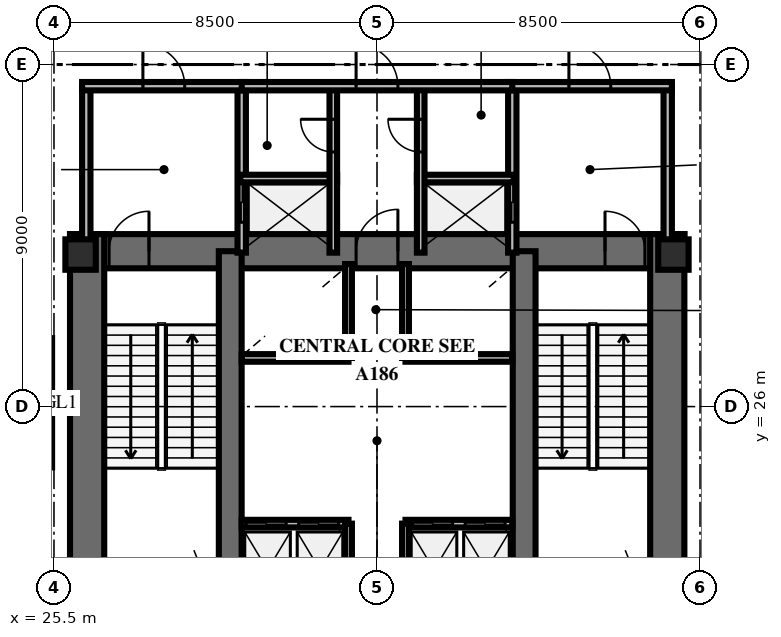
"""IFC4 building model, lengths in metres.
Left out: names, types, materials, properties, quantities, classifications, styles, units other than length and angle.
Written with IfcOpenShell. Run it as: python <this file> out.ifc"""

import sys

from ifc_helpers import new_model, si_unit, direction, frame, frame_2d, origin, origin_2d, place, context, subcontext, project, spatial, rectangle, extrude, element, fill, save


model = new_model("IFC4")
c1 = context("Model", 3, precision=1e-05, world=origin(), true_north=direction((0.0, 1.0)))
c2 = subcontext(c1, "Body", "Model", "MODEL_VIEW")
j1 = project(units=[si_unit("LENGTHUNIT", "METRE"), si_unit("PLANEANGLEUNIT", "RADIAN")], contexts=[c1])
p1 = place(None, origin())
s1 = spatial("IfcSite", under=j1, at=p1, CompositionType="ELEMENT")
p2 = place(p1, origin())
s2 = spatial("IfcBuilding", under=s1, at=p2, CompositionType="ELEMENT")
p3 = place(p2, frame((0.0, 0.0, 15.6)))
s3 = spatial("IfcBuildingStorey", under=s2, at=p3, CompositionType="ELEMENT", Elevation=15.6)
p4 = place(p3, frame((25.922, 30.088, 0.0), z_axis=(0.0, 0.0, 1.0), x_axis=(1.0, 0.0, 0.0)))
e1 = element("IfcWall", 1, at=p4, inside=s3, PredefinedType="SHEAR", context=c2, shape_type="SweptSolid", body=[
    extrude(rectangle(XDim=16.166, YDim=0.9, at=frame_2d((8.083, 0.0))), origin(), (0.0, 0.0, 1.0), 4.8),
])
p5 = place(p4, frame((1.028, 0.0, 0.0)))
e2 = element("IfcOpeningElement", 2, at=p5, cuts=e1, PredefinedType="OPENING", context=c2, shape_type="SweptSolid", body=[
    extrude(rectangle(XDim=1.05, YDim=2.15, at=frame_2d((0.525, 1.075))), frame((0.0, 0.46, 0.0), z_axis=(0.0, -1.0, 0.0), x_axis=(1.0, 0.0, 0.0)), (0.0, 0.0, 1.0), 0.92),
])
p6 = place(p4, frame((14.078, 0.0, 0.0)))
e3 = element("IfcOpeningElement", 3, at=p6, cuts=e1, PredefinedType="OPENING", context=c2, shape_type="SweptSolid", body=[
    extrude(rectangle(XDim=1.05, YDim=2.15, at=frame_2d((0.525, 1.075))), frame((0.0, 0.46, 0.0), z_axis=(0.0, -1.0, 0.0), x_axis=(1.0, 0.0, 0.0)), (0.0, 0.0, 1.0), 0.92),
])
p7 = place(p4, frame((7.528, 0.0, 0.0)))
e4 = element("IfcOpeningElement", 4, at=p7, cuts=e1, PredefinedType="OPENING", context=c2, shape_type="SweptSolid", body=[
    extrude(rectangle(XDim=1.1, YDim=2.15, at=frame_2d((0.55, 1.075))), frame((0.0, 0.46, 0.0), z_axis=(0.0, -1.0, 0.0), x_axis=(1.0, 0.0, 0.0)), (0.0, 0.0, 1.0), 0.92),
])
for number, where, z_axis, x_axis in (
    (5, (26.372, 19.662, 0.0), (0.0, 0.0, 1.0), (0.0, 1.0, 0.0)),
    (6, (41.638, 19.662, 0.0), (0.0, 0.0, 1.0), (0.0, 1.0, 0.0)),
):
    element("IfcWall", number, at=place(p3, frame(where, z_axis=z_axis, x_axis=x_axis)), inside=s3, PredefinedType="SHEAR", context=c2, shape_type="SweptSolid", body=[
        extrude(rectangle(XDim=10.876, YDim=0.9, at=frame_2d((5.438, 0.0))), origin(), (0.0, 0.0, 1.0), 4.8),
    ])
for number, where, z_axis, x_axis in (
    (7, (30.138, 20.112, 0.0), (0.0, 0.0, 1.0), (0.0, 1.0, 0.0)),
    (8, (37.872, 20.112, 0.0), (0.0, 0.0, 1.0), (0.0, 1.0, 0.0)),
):
    element("IfcWall", number, at=place(p3, frame(where, z_axis=z_axis, x_axis=x_axis)), inside=s3, PredefinedType="SHEAR", context=c2, shape_type="SweptSolid", body=[
        extrude(rectangle(XDim=9.976, YDim=0.6, at=frame_2d((4.988, 0.0))), origin(), (0.0, 0.0, 1.0), 4.8),
    ])
for number, where, z_axis, x_axis in (
    (9, (26.2, 30.0, 0.0), (0.0, 0.0, 1.0), (1.0, 0.0, 0.0)),
    (10, (41.8, 30.0, 0.0), (0.0, 0.0, 1.0), (1.0, 0.0, 0.0)),
):
    element("IfcColumn", number, at=place(p3, frame(where, z_axis=z_axis, x_axis=x_axis)), inside=s3, PredefinedType="PILASTER", context=c2, shape_type="SweptSolid", body=[
        extrude(rectangle(XDim=0.8, YDim=0.8, at=origin_2d()), origin(), (0.0, 0.0, 1.0), 4.8),
    ])
p8 = place(p3, frame((26.35, 30.05, 0.0), z_axis=(0.0, 0.0, 1.0), x_axis=(0.0, 1.0, 0.0)))
e11 = element("IfcWall", 11, at=p8, inside=s3, PredefinedType="SOLIDWALL", context=c2, shape_type="SweptSolid", body=[
    extrude(rectangle(XDim=4.38, YDim=0.22, at=frame_2d((2.19, 0.0))), origin(), (0.0, 0.0, 1.0), 2.61),
])
p9 = place(p3, frame((30.44, 30.05, 0.0), z_axis=(0.0, 0.0, 1.0), x_axis=(0.0, 1.0, 0.0)))
e12 = element("IfcWall", 12, at=p9, inside=s3, PredefinedType="SOLIDWALL", context=c2, shape_type="SweptSolid", body=[
    extrude(rectangle(XDim=4.38, YDim=0.22, at=frame_2d((2.19, 0.0))), origin(), (0.0, 0.0, 1.0), 2.61),
])
p10 = place(p9, frame((0.8, 0.0, 0.0)))
e13 = element("IfcOpeningElement", 13, at=p10, cuts=e12, PredefinedType="OPENING", context=c2, shape_type="SweptSolid", body=[
    extrude(rectangle(XDim=1.05, YDim=2.1, at=frame_2d((0.525, 1.05))), frame((0.0, 0.12, 0.0), z_axis=(0.0, -1.0, 0.0), x_axis=(1.0, 0.0, 0.0)), (0.0, 0.0, 1.0), 0.24),
])
p11 = place(p3, frame((26.24, 34.43, 0.0), z_axis=(0.0, 0.0, 1.0), x_axis=(1.0, 0.0, 0.0)))
e14 = element("IfcWall", 14, at=p11, inside=s3, PredefinedType="SOLIDWALL", context=c2, shape_type="SweptSolid", body=[
    extrude(rectangle(XDim=4.31, YDim=0.22, at=frame_2d((2.155, 0.0))), origin(), (0.0, 0.0, 1.0), 2.61),
])
p12 = place(p11, frame((1.6, 0.0, 0.0)))
e15 = element("IfcOpeningElement", 15, at=p12, cuts=e14, PredefinedType="OPENING", context=c2, shape_type="SweptSolid", body=[
    extrude(rectangle(XDim=1.1, YDim=2.15, at=frame_2d((0.55, 1.075))), frame((0.0, 0.12, 0.0), z_axis=(0.0, -1.0, 0.0), x_axis=(1.0, 0.0, 0.0)), (0.0, 0.0, 1.0), 0.24),
])
p13 = place(p3, frame((30.4, 32.0, 0.0), z_axis=(0.0, 0.0, 1.0), x_axis=(1.0, 0.0, 0.0)))
e16 = element("IfcWall", 16, at=p13, inside=s3, PredefinedType="SOLIDWALL", context=c2, shape_type="SweptSolid", body=[
    extrude(rectangle(XDim=2.55, YDim=0.2, at=frame_2d((1.275, 0.0))), origin(), (0.0, 0.0, 1.0), 2.61),
])
p14 = place(p3, frame((32.85, 30.05, 0.0), z_axis=(0.0, 0.0, 1.0), x_axis=(0.0, 1.0, 0.0)))
e17 = element("IfcWall", 17, at=p14, inside=s3, PredefinedType="SOLIDWALL", context=c2, shape_type="SweptSolid", body=[
    extrude(rectangle(XDim=4.38, YDim=0.2, at=frame_2d((2.19, 0.0))), origin(), (0.0, 0.0, 1.0), 2.61),
])
p15 = place(p14, frame((2.65, 0.0, 0.0)))
e18 = element("IfcOpeningElement", 18, at=p15, cuts=e17, PredefinedType="OPENING", context=c2, shape_type="SweptSolid", body=[
    extrude(rectangle(XDim=0.86, YDim=2.05, at=frame_2d((0.43, 1.025))), frame((0.0, 0.11, 0.0), z_axis=(0.0, -1.0, 0.0), x_axis=(1.0, 0.0, 0.0)), (0.0, 0.0, 1.0), 0.22),
])
p16 = place(p3, frame((37.56, 30.05, 0.0), z_axis=(0.0, 0.0, 1.0), x_axis=(0.0, 1.0, 0.0)))
e19 = element("IfcWall", 19, at=p16, inside=s3, PredefinedType="SOLIDWALL", context=c2, shape_type="SweptSolid", body=[
    extrude(rectangle(XDim=4.38, YDim=0.22, at=frame_2d((2.19, 0.0))), origin(), (0.0, 0.0, 1.0), 2.61),
])
p17 = place(p16, frame((0.8, 0.0, 0.0)))
e20 = element("IfcOpeningElement", 20, at=p17, cuts=e19, PredefinedType="OPENING", context=c2, shape_type="SweptSolid", body=[
    extrude(rectangle(XDim=1.05, YDim=2.1, at=frame_2d((0.525, 1.05))), frame((0.0, 0.12, 0.0), z_axis=(0.0, -1.0, 0.0), x_axis=(1.0, 0.0, 0.0)), (0.0, 0.0, 1.0), 0.24),
])
p18 = place(p3, frame((41.65, 30.05, 0.0), z_axis=(0.0, 0.0, 1.0), x_axis=(0.0, 1.0, 0.0)))
e21 = element("IfcWall", 21, at=p18, inside=s3, PredefinedType="SOLIDWALL", context=c2, shape_type="SweptSolid", body=[
    extrude(rectangle(XDim=4.38, YDim=0.22, at=frame_2d((2.19, 0.0))), origin(), (0.0, 0.0, 1.0), 2.61),
])
p19 = place(p3, frame((37.45, 34.43, 0.0), z_axis=(0.0, 0.0, 1.0), x_axis=(1.0, 0.0, 0.0)))
e22 = element("IfcWall", 22, at=p19, inside=s3, PredefinedType="SOLIDWALL", context=c2, shape_type="SweptSolid", body=[
    extrude(rectangle(XDim=4.31, YDim=0.22, at=frame_2d((2.155, 0.0))), origin(), (0.0, 0.0, 1.0), 2.61),
])
p20 = place(p19, frame((1.6, 0.0, 0.0)))
e23 = element("IfcOpeningElement", 23, at=p20, cuts=e22, PredefinedType="OPENING", context=c2, shape_type="SweptSolid", body=[
    extrude(rectangle(XDim=1.1, YDim=2.15, at=frame_2d((0.55, 1.075))), frame((0.0, 0.12, 0.0), z_axis=(0.0, -1.0, 0.0), x_axis=(1.0, 0.0, 0.0)), (0.0, 0.0, 1.0), 0.24),
])
p21 = place(p3, frame((35.05, 32.0, 0.0), z_axis=(0.0, 0.0, 1.0), x_axis=(1.0, 0.0, 0.0)))
e24 = element("IfcWall", 24, at=p21, inside=s3, PredefinedType="SOLIDWALL", context=c2, shape_type="SweptSolid", body=[
    extrude(rectangle(XDim=2.55, YDim=0.2, at=frame_2d((1.275, 0.0))), origin(), (0.0, 0.0, 1.0), 2.61),
])
p22 = place(p3, frame((35.15, 30.05, 0.0), z_axis=(0.0, 0.0, 1.0), x_axis=(0.0, 1.0, 0.0)))
e25 = element("IfcWall", 25, at=p22, inside=s3, PredefinedType="SOLIDWALL", context=c2, shape_type="SweptSolid", body=[
    extrude(rectangle(XDim=4.38, YDim=0.2, at=frame_2d((2.19, 0.0))), origin(), (0.0, 0.0, 1.0), 2.61),
])
p23 = place(p22, frame((2.65, 0.0, 0.0)))
e26 = element("IfcOpeningElement", 26, at=p23, cuts=e25, PredefinedType="OPENING", context=c2, shape_type="SweptSolid", body=[
    extrude(rectangle(XDim=0.86, YDim=2.05, at=frame_2d((0.43, 1.025))), frame((0.0, 0.11, 0.0), z_axis=(0.0, -1.0, 0.0), x_axis=(1.0, 0.0, 0.0)), (0.0, 0.0, 1.0), 0.22),
])
p24 = place(p3, frame((30.44, 34.43, 0.0), z_axis=(0.0, 0.0, 1.0), x_axis=(1.0, 0.0, 0.0)))
e27 = element("IfcWall", 27, at=p24, inside=s3, PredefinedType="SOLIDWALL", context=c2, shape_type="SweptSolid", body=[
    extrude(rectangle(XDim=7.12, YDim=0.22, at=frame_2d((3.56, 0.0))), origin(), (0.0, 0.0, 1.0), 2.61),
])
p25 = place(p24, frame((3.01, 0.0, 0.0)))
e28 = element("IfcOpeningElement", 28, at=p25, cuts=e27, PredefinedType="OPENING", context=c2, shape_type="SweptSolid", body=[
    extrude(rectangle(XDim=1.1, YDim=2.15, at=frame_2d((0.55, 1.075))), frame((0.0, 0.12, 0.0), z_axis=(0.0, -1.0, 0.0), x_axis=(1.0, 0.0, 0.0)), (0.0, 0.0, 1.0), 0.24),
])
p26 = place(p3, frame((30.44, 22.92, 0.0), z_axis=(0.0, 0.0, 1.0), x_axis=(1.0, 0.0, 0.0)))
e29 = element("IfcWall", 29, at=p26, inside=s3, PredefinedType="SOLIDWALL", context=c2, shape_type="SweptSolid", body=[
    extrude(rectangle(XDim=2.81, YDim=0.2, at=frame_2d((1.405, 0.0))), origin(), (0.0, 0.0, 1.0), 2.61),
])
p27 = place(p26, frame((0.12, 0.0, 0.0)))
e30 = element("IfcOpeningElement", 30, at=p27, cuts=e29, PredefinedType="OPENING", context=c2, shape_type="SweptSolid", body=[
    extrude(rectangle(XDim=1.05, YDim=2.1, at=frame_2d((0.525, 1.05))), frame((0.0, 0.11, 0.0), z_axis=(0.0, -1.0, 0.0), x_axis=(1.0, 0.0, 0.0)), (0.0, 0.0, 1.0), 0.22),
])
p28 = place(p26, frame((1.5, 0.0, 0.0)))
e31 = element("IfcOpeningElement", 31, at=p28, cuts=e29, PredefinedType="OPENING", context=c2, shape_type="SweptSolid", body=[
    extrude(rectangle(XDim=1.05, YDim=2.1, at=frame_2d((0.525, 1.05))), frame((0.0, 0.11, 0.0), z_axis=(0.0, -1.0, 0.0), x_axis=(1.0, 0.0, 0.0)), (0.0, 0.0, 1.0), 0.22),
])
p29 = place(p3, frame((33.25, 20.5, 0.0), z_axis=(0.0, 0.0, 1.0), x_axis=(0.0, 1.0, 0.0)))
e32 = element("IfcWall", 32, at=p29, inside=s3, PredefinedType="SOLIDWALL", context=c2, shape_type="SweptSolid", body=[
    extrude(rectangle(XDim=2.42, YDim=0.18, at=frame_2d((1.21, 0.0))), origin(), (0.0, 0.0, 1.0), 2.61),
])
p30 = place(p3, frame((34.75, 22.92, 0.0), z_axis=(0.0, 0.0, 1.0), x_axis=(1.0, 0.0, 0.0)))
e33 = element("IfcWall", 33, at=p30, inside=s3, PredefinedType="SOLIDWALL", context=c2, shape_type="SweptSolid", body=[
    extrude(rectangle(XDim=2.81, YDim=0.2, at=frame_2d((1.405, 0.0))), origin(), (0.0, 0.0, 1.0), 2.61),
])
p31 = place(p30, frame((0.19, 0.0, 0.0)))
e34 = element("IfcOpeningElement", 34, at=p31, cuts=e33, PredefinedType="OPENING", context=c2, shape_type="SweptSolid", body=[
    extrude(rectangle(XDim=1.05, YDim=2.1, at=frame_2d((0.525, 1.05))), frame((0.0, 0.11, 0.0), z_axis=(0.0, -1.0, 0.0), x_axis=(1.0, 0.0, 0.0)), (0.0, 0.0, 1.0), 0.22),
])
p32 = place(p30, frame((1.57, 0.0, 0.0)))
e35 = element("IfcOpeningElement", 35, at=p32, cuts=e33, PredefinedType="OPENING", context=c2, shape_type="SweptSolid", body=[
    extrude(rectangle(XDim=1.05, YDim=2.1, at=frame_2d((0.525, 1.05))), frame((0.0, 0.11, 0.0), z_axis=(0.0, -1.0, 0.0), x_axis=(1.0, 0.0, 0.0)), (0.0, 0.0, 1.0), 0.22),
])
p33 = place(p3, frame((34.75, 20.5, 0.0), z_axis=(0.0, 0.0, 1.0), x_axis=(0.0, 1.0, 0.0)))
e36 = element("IfcWall", 36, at=p33, inside=s3, PredefinedType="SOLIDWALL", context=c2, shape_type="SweptSolid", body=[
    extrude(rectangle(XDim=2.42, YDim=0.18, at=frame_2d((1.21, 0.0))), origin(), (0.0, 0.0, 1.0), 2.61),
])
p34 = place(p3, frame((30.44, 27.28, 0.0), z_axis=(0.0, 0.0, 1.0), x_axis=(1.0, 0.0, 0.0)))
e37 = element("IfcWall", 37, at=p34, inside=s3, PredefinedType="SOLIDWALL", context=c2, shape_type="SweptSolid", body=[
    extrude(rectangle(XDim=2.81, YDim=0.2, at=frame_2d((1.405, 0.0))), origin(), (0.0, 0.0, 1.0), 2.61),
])
p35 = place(p3, frame((33.25, 27.28, 0.0), z_axis=(0.0, 0.0, 1.0), x_axis=(0.0, 1.0, 0.0)))
e38 = element("IfcWall", 38, at=p35, inside=s3, PredefinedType="SOLIDWALL", context=c2, shape_type="SweptSolid", body=[
    extrude(rectangle(XDim=2.47, YDim=0.18, at=frame_2d((1.235, 0.0))), origin(), (0.0, 0.0, 1.0), 2.61),
])
p36 = place(p3, frame((34.75, 27.28, 0.0), z_axis=(0.0, 0.0, 1.0), x_axis=(1.0, 0.0, 0.0)))
e39 = element("IfcWall", 39, at=p36, inside=s3, PredefinedType="SOLIDWALL", context=c2, shape_type="SweptSolid", body=[
    extrude(rectangle(XDim=2.81, YDim=0.2, at=frame_2d((1.405, 0.0))), origin(), (0.0, 0.0, 1.0), 2.61),
])
p37 = place(p3, frame((34.75, 27.28, 0.0), z_axis=(0.0, 0.0, 1.0), x_axis=(0.0, 1.0, 0.0)))
e40 = element("IfcWall", 40, at=p37, inside=s3, PredefinedType="SOLIDWALL", context=c2, shape_type="SweptSolid", body=[
    extrude(rectangle(XDim=2.47, YDim=0.18, at=frame_2d((1.235, 0.0))), origin(), (0.0, 0.0, 1.0), 2.61),
])
p38 = place(p5, origin())
e41 = element("IfcDoor", 41, at=p38, inside=s3, OperationType="SINGLE_SWING_RIGHT", PredefinedType="DOOR", context=c2, shape_type="SweptSolid", body=[
    extrude(rectangle(XDim=1.05, YDim=2.15, at=frame_2d((0.525, 1.075))), frame((0.0, 0.025, 0.0), z_axis=(0.0, -1.0, 0.0), x_axis=(1.0, 0.0, 0.0)), (0.0, 0.0, 1.0), 0.05),
])
fill(e2, e41)
p39 = place(p6, origin())
e42 = element("IfcDoor", 42, at=p39, inside=s3, OperationType="SINGLE_SWING_LEFT", PredefinedType="DOOR", context=c2, shape_type="SweptSolid", body=[
    extrude(rectangle(XDim=1.05, YDim=2.15, at=frame_2d((0.525, 1.075))), frame((0.0, 0.025, 0.0), z_axis=(0.0, -1.0, 0.0), x_axis=(1.0, 0.0, 0.0)), (0.0, 0.0, 1.0), 0.05),
])
fill(e3, e42)
p40 = place(p7, origin())
e43 = element("IfcDoor", 43, at=p40, inside=s3, OperationType="SINGLE_SWING_RIGHT", PredefinedType="DOOR", context=c2, shape_type="SweptSolid", body=[
    extrude(rectangle(XDim=1.1, YDim=2.15, at=frame_2d((0.55, 1.075))), frame((0.0, 0.025, 0.0), z_axis=(0.0, -1.0, 0.0), x_axis=(1.0, 0.0, 0.0)), (0.0, 0.0, 1.0), 0.05),
])
fill(e4, e43)
p41 = place(p12, origin())
e44 = element("IfcDoor", 44, at=p41, inside=s3, OperationType="SINGLE_SWING_LEFT", PredefinedType="DOOR", context=c2, shape_type="SweptSolid", body=[
    extrude(rectangle(XDim=1.1, YDim=2.15, at=frame_2d((0.55, 1.075))), frame((0.0, 0.025, 0.0), z_axis=(0.0, -1.0, 0.0), x_axis=(1.0, 0.0, 0.0)), (0.0, 0.0, 1.0), 0.05),
])
fill(e15, e44)
p42 = place(p10, origin())
e45 = element("IfcDoor", 45, at=p42, inside=s3, OperationType="DOUBLE_DOOR_SLIDING", PredefinedType="USERDEFINED", context=c2, shape_type="SweptSolid", body=[
    extrude(rectangle(XDim=1.05, YDim=2.1, at=frame_2d((0.525, 1.05))), frame((0.0, 0.025, 0.0), z_axis=(0.0, -1.0, 0.0), x_axis=(1.0, 0.0, 0.0)), (0.0, 0.0, 1.0), 0.05),
])
fill(e13, e45)
p43 = place(p15, origin())
e46 = element("IfcDoor", 46, at=p43, inside=s3, OperationType="SINGLE_SWING_RIGHT", PredefinedType="TRAPDOOR", context=c2, shape_type="SweptSolid", body=[
    extrude(rectangle(XDim=0.86, YDim=2.05, at=frame_2d((0.43, 1.025))), frame((0.0, 0.025, 0.0), z_axis=(0.0, -1.0, 0.0), x_axis=(1.0, 0.0, 0.0)), (0.0, 0.0, 1.0), 0.05),
])
fill(e18, e46)
p44 = place(p20, origin())
e47 = element("IfcDoor", 47, at=p44, inside=s3, OperationType="SINGLE_SWING_LEFT", PredefinedType="DOOR", context=c2, shape_type="SweptSolid", body=[
    extrude(rectangle(XDim=1.1, YDim=2.15, at=frame_2d((0.55, 1.075))), frame((0.0, 0.025, 0.0), z_axis=(0.0, -1.0, 0.0), x_axis=(1.0, 0.0, 0.0)), (0.0, 0.0, 1.0), 0.05),
])
fill(e23, e47)
p45 = place(p17, origin())
e48 = element("IfcDoor", 48, at=p45, inside=s3, OperationType="DOUBLE_DOOR_SLIDING", PredefinedType="USERDEFINED", context=c2, shape_type="SweptSolid", body=[
    extrude(rectangle(XDim=1.05, YDim=2.1, at=frame_2d((0.525, 1.05))), frame((0.0, 0.025, 0.0), z_axis=(0.0, -1.0, 0.0), x_axis=(1.0, 0.0, 0.0)), (0.0, 0.0, 1.0), 0.05),
])
fill(e20, e48)
p46 = place(p23, origin())
e49 = element("IfcDoor", 49, at=p46, inside=s3, OperationType="SINGLE_SWING_RIGHT", PredefinedType="TRAPDOOR", context=c2, shape_type="SweptSolid", body=[
    extrude(rectangle(XDim=0.86, YDim=2.05, at=frame_2d((0.43, 1.025))), frame((0.0, 0.025, 0.0), z_axis=(0.0, -1.0, 0.0), x_axis=(1.0, 0.0, 0.0)), (0.0, 0.0, 1.0), 0.05),
])
fill(e26, e49)
p47 = place(p25, origin())
e50 = element("IfcDoor", 50, at=p47, inside=s3, OperationType="SINGLE_SWING_LEFT", PredefinedType="DOOR", context=c2, shape_type="SweptSolid", body=[
    extrude(rectangle(XDim=1.1, YDim=2.15, at=frame_2d((0.55, 1.075))), frame((0.0, 0.025, 0.0), z_axis=(0.0, -1.0, 0.0), x_axis=(1.0, 0.0, 0.0)), (0.0, 0.0, 1.0), 0.05),
])
fill(e28, e50)
p48 = place(p27, origin())
e51 = element("IfcDoor", 51, at=p48, inside=s3, OperationType="DOUBLE_DOOR_SLIDING", PredefinedType="USERDEFINED", context=c2, shape_type="SweptSolid", body=[
    extrude(rectangle(XDim=1.05, YDim=2.1, at=frame_2d((0.525, 1.05))), frame((0.0, 0.025, 0.0), z_axis=(0.0, -1.0, 0.0), x_axis=(1.0, 0.0, 0.0)), (0.0, 0.0, 1.0), 0.05),
])
fill(e30, e51)
p49 = place(p28, origin())
e52 = element("IfcDoor", 52, at=p49, inside=s3, OperationType="DOUBLE_DOOR_SLIDING", PredefinedType="USERDEFINED", context=c2, shape_type="SweptSolid", body=[
    extrude(rectangle(XDim=1.05, YDim=2.1, at=frame_2d((0.525, 1.05))), frame((0.0, 0.025, 0.0), z_axis=(0.0, -1.0, 0.0), x_axis=(1.0, 0.0, 0.0)), (0.0, 0.0, 1.0), 0.05),
])
fill(e31, e52)
p50 = place(p31, origin())
e53 = element("IfcDoor", 53, at=p50, inside=s3, OperationType="DOUBLE_DOOR_SLIDING", PredefinedType="USERDEFINED", context=c2, shape_type="SweptSolid", body=[
    extrude(rectangle(XDim=1.05, YDim=2.1, at=frame_2d((0.525, 1.05))), frame((0.0, 0.025, 0.0), z_axis=(0.0, -1.0, 0.0), x_axis=(1.0, 0.0, 0.0)), (0.0, 0.0, 1.0), 0.05),
])
fill(e34, e53)
p51 = place(p32, origin())
e54 = element("IfcDoor", 54, at=p51, inside=s3, OperationType="DOUBLE_DOOR_SLIDING", PredefinedType="USERDEFINED", context=c2, shape_type="SweptSolid", body=[
    extrude(rectangle(XDim=1.05, YDim=2.1, at=frame_2d((0.525, 1.05))), frame((0.0, 0.025, 0.0), z_axis=(0.0, -1.0, 0.0), x_axis=(1.0, 0.0, 0.0)), (0.0, 0.0, 1.0), 0.05),
])
fill(e35, e54)
save(model, sys.argv[1])
